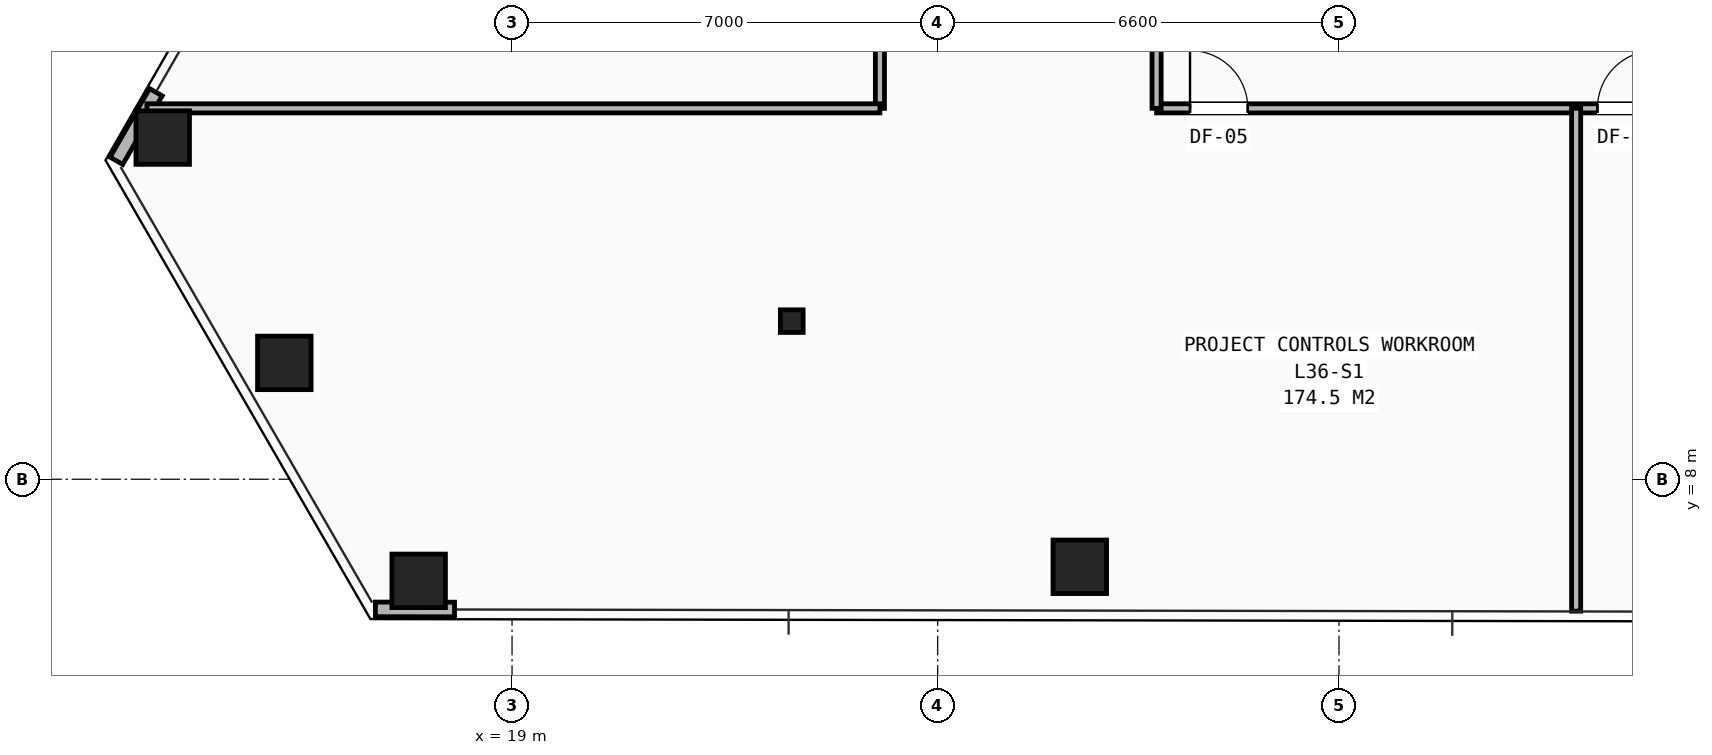
"""IFC4 building model, lengths in metres.
Left out: names, types, materials, properties, quantities, classifications, styles, units other than length and angle.
Written with IfcOpenShell. Run it as: python <this file> out.ifc"""

import sys

from ifc_helpers import new_model, si_unit, direction, frame, frame_2d, origin, origin_2d, place, context, subcontext, project, spatial, rectangle, hollow_rectangle, i_section, extrude, element, fill, save


model = new_model("IFC4")
c1 = context("Model", 3, precision=1e-05, world=origin(), true_north=direction((0.0, 1.0)))
c2 = subcontext(c1, "Body", "Model", "MODEL_VIEW")
j1 = project(units=[si_unit("LENGTHUNIT", "METRE"), si_unit("PLANEANGLEUNIT", "RADIAN")], contexts=[c1])
p1 = place(None, origin())
s1 = spatial("IfcSite", under=j1, at=p1, CompositionType="ELEMENT")
p2 = place(p1, origin())
s2 = spatial("IfcBuilding", under=s1, at=p2, CompositionType="ELEMENT")
p3 = place(p2, frame((0.0, 0.0, 126.35)))
s3 = spatial("IfcBuildingStorey", under=s2, at=p3, CompositionType="ELEMENT", Elevation=126.35)
p4 = place(p3, frame((23.6, 10.6, 0.0), z_axis=(0.0, 0.0, 1.0), x_axis=(1.0, 0.0, 0.0)))
e1 = element("IfcColumn", 1, at=p4, inside=s3, PredefinedType="COLUMN", context=c2, shape_type="SweptSolid", body=[
    extrude(i_section(OverallWidth=0.374, OverallDepth=0.372, WebThickness=0.016, FlangeThickness=0.026, at=origin_2d()), origin(), (0.0, 0.0, 1.0), 3.45),
])
for number, where, z_axis, x_axis in (
    (2, (13.255, 13.619, 0.0), (0.0, 0.0, 1.0), (1.0, 0.0, 0.0)),
    (3, (15.255, 9.913, 0.0), (0.0, 0.0, 1.0), (1.0, 0.0, 0.0)),
    (4, (17.464, 6.329, 0.0), (0.0, 0.0, 1.0), (1.0, 0.0, 0.0)),
    (5, (28.337, 6.56, 0.0), (0.0, 0.0, 1.0), (1.0, 0.0, 0.0)),
):
    element("IfcColumn", number, at=place(p3, frame(where, z_axis=z_axis, x_axis=x_axis)), inside=s3, PredefinedType="COLUMN", context=c2, shape_type="SweptSolid", body=[
        extrude(hollow_rectangle(XDim=0.88, YDim=0.88, WallThickness=0.06, at=origin_2d()), origin(), (0.0, 0.0, 1.0), 3.45),
    ])
p5 = place(p3, frame((13.142, 14.365, 0.0), z_axis=(0.0, 0.0, 1.0), x_axis=(-0.498460550087, -0.86691238312, 0.0)))
e6 = element("IfcWall", 6, at=p5, inside=s3, PredefinedType="SHEAR", context=c2, shape_type="SweptSolid", body=[
    extrude(rectangle(XDim=1.301, YDim=0.24, at=frame_2d((0.651, 0.0))), origin(), (0.0, 0.0, 1.0), 2.583),
])
p6 = place(p3, frame((16.753, 5.86, 0.0), z_axis=(0.0, 0.0, 1.0), x_axis=(0.999998574928, -0.001688236199, 0.0)))
e7 = element("IfcWall", 7, at=p6, inside=s3, PredefinedType="SHEAR", context=c2, shape_type="SweptSolid", body=[
    extrude(rectangle(XDim=1.302, YDim=0.24, at=frame_2d((0.651, 0.0))), origin(), (0.0, 0.0, 1.0), 2.583),
])
p7 = place(p3, frame((29.6, 14.1, 0.0), z_axis=(0.0, 0.0, 1.0), x_axis=(1.0, 0.0, 0.0)))
e8 = element("IfcWall", 8, at=p7, inside=s3, PredefinedType="PARTITIONING", context=c2, shape_type="SweptSolid", body=[
    extrude(rectangle(XDim=18.6, YDim=0.15, at=frame_2d((9.3, 0.0))), origin(), (0.0, 0.0, 1.0), 2.225),
])
p8 = place(p7, frame((0.55, 0.0, 0.0)))
e9 = element("IfcOpeningElement", 9, at=p8, cuts=e8, PredefinedType="OPENING", context=c2, shape_type="SweptSolid", body=[
    extrude(rectangle(XDim=0.95, YDim=2.1, at=frame_2d((0.475, 1.05))), frame((0.0, 0.085, 0.0), z_axis=(0.0, -1.0, 0.0), x_axis=(1.0, 0.0, 0.0)), (0.0, 0.0, 1.0), 0.17),
])
p9 = place(p7, frame((7.25, 0.0, 0.0)))
e10 = element("IfcOpeningElement", 10, at=p9, cuts=e8, PredefinedType="OPENING", context=c2, shape_type="SweptSolid", body=[
    extrude(rectangle(XDim=0.95, YDim=2.1, at=frame_2d((0.475, 1.05))), frame((0.0, 0.085, 0.0), z_axis=(0.0, -1.0, 0.0), x_axis=(1.0, 0.0, 0.0)), (0.0, 0.0, 1.0), 0.17),
])
p10 = place(p7, frame((13.75, 0.0, 0.0)))
e11 = element("IfcOpeningElement", 11, at=p10, cuts=e8, PredefinedType="OPENING", context=c2, shape_type="SweptSolid", body=[
    extrude(rectangle(XDim=0.95, YDim=2.1, at=frame_2d((0.475, 1.05))), frame((0.0, 0.085, 0.0), z_axis=(0.0, -1.0, 0.0), x_axis=(1.0, 0.0, 0.0)), (0.0, 0.0, 1.0), 0.17),
])
p11 = place(p3, frame((29.6, 14.1, 0.0), z_axis=(0.0, 0.0, 1.0), x_axis=(0.0, 1.0, 0.0)))
e12 = element("IfcWall", 12, at=p11, inside=s3, PredefinedType="PARTITIONING", context=c2, shape_type="SweptSolid", body=[
    extrude(rectangle(XDim=8.7, YDim=0.15, at=frame_2d((4.35, 0.0))), origin(), (0.0, 0.0, 1.0), 3.21),
])
p12 = place(p11, frame((2.65, 0.0, 0.0)))
e13 = element("IfcOpeningElement", 13, at=p12, cuts=e12, PredefinedType="OPENING", context=c2, shape_type="SweptSolid", body=[
    extrude(rectangle(XDim=0.85, YDim=2.05, at=frame_2d((0.425, 1.025))), frame((0.0, 0.085, 0.0), z_axis=(0.0, -1.0, 0.0), x_axis=(1.0, 0.0, 0.0)), (0.0, 0.0, 1.0), 0.17),
])
p13 = place(p11, frame((4.75, 0.0, 0.0)))
e14 = element("IfcOpeningElement", 14, at=p13, cuts=e12, PredefinedType="OPENING", context=c2, shape_type="SweptSolid", body=[
    extrude(rectangle(XDim=0.85, YDim=2.05, at=frame_2d((0.425, 1.025))), frame((0.0, 0.085, 0.0), z_axis=(0.0, -1.0, 0.0), x_axis=(1.0, 0.0, 0.0)), (0.0, 0.0, 1.0), 0.17),
])
p14 = place(p11, frame((6.85, 0.0, 0.0)))
e15 = element("IfcOpeningElement", 15, at=p14, cuts=e12, PredefinedType="OPENING", context=c2, shape_type="SweptSolid", body=[
    extrude(rectangle(XDim=0.85, YDim=2.05, at=frame_2d((0.425, 1.025))), frame((0.0, 0.085, 0.0), z_axis=(0.0, -1.0, 0.0), x_axis=(1.0, 0.0, 0.0)), (0.0, 0.0, 1.0), 0.17),
])
p15 = place(p3, frame((25.05, 14.1, 0.0), z_axis=(0.0, 0.0, 1.0), x_axis=(0.0, 1.0, 0.0)))
e16 = element("IfcWall", 16, at=p15, inside=s3, PredefinedType="PARTITIONING", context=c2, shape_type="SweptSolid", body=[
    extrude(rectangle(XDim=8.7, YDim=0.15, at=frame_2d((4.35, 0.0))), origin(), (0.0, 0.0, 1.0), 3.21),
])
p16 = place(p3, frame((36.5, 5.83, 0.0), z_axis=(0.0, 0.0, 1.0), x_axis=(0.0, 1.0, 0.0)))
e17 = element("IfcWall", 17, at=p16, inside=s3, PredefinedType="PARTITIONING", context=c2, shape_type="SweptSolid", body=[
    extrude(rectangle(XDim=8.27, YDim=0.15, at=frame_2d((4.135, 0.0))), origin(), (0.0, 0.0, 1.0), 2.225),
])
p17 = place(p3, frame((12.995, 14.1, 0.0), z_axis=(0.0, 0.0, 1.0), x_axis=(1.0, 0.0, 0.0)))
e18 = element("IfcWall", 18, at=p17, inside=s3, PredefinedType="PARTITIONING", context=c2, shape_type="SweptSolid", body=[
    extrude(rectangle(XDim=12.055, YDim=0.15, at=frame_2d((6.027, 0.0))), origin(), (0.0, 0.0, 1.0), 2.589),
])
p18 = place(p8, origin())
e19 = element("IfcDoor", 19, at=p18, inside=s3, OperationType="SINGLE_SWING_LEFT", PredefinedType="DOOR", context=c2, shape_type="SweptSolid", body=[
    extrude(rectangle(XDim=0.95, YDim=2.1, at=frame_2d((0.475, 1.05))), frame((0.0, 0.025, 0.0), z_axis=(0.0, -1.0, 0.0), x_axis=(1.0, 0.0, 0.0)), (0.0, 0.0, 1.0), 0.05),
])
fill(e9, e19)
p19 = place(p9, origin())
e20 = element("IfcDoor", 20, at=p19, inside=s3, OperationType="SINGLE_SWING_RIGHT", PredefinedType="DOOR", context=c2, shape_type="SweptSolid", body=[
    extrude(rectangle(XDim=0.95, YDim=2.1, at=frame_2d((0.475, 1.05))), frame((0.0, 0.025, 0.0), z_axis=(0.0, -1.0, 0.0), x_axis=(1.0, 0.0, 0.0)), (0.0, 0.0, 1.0), 0.05),
])
fill(e10, e20)
save(model, sys.argv[1])
